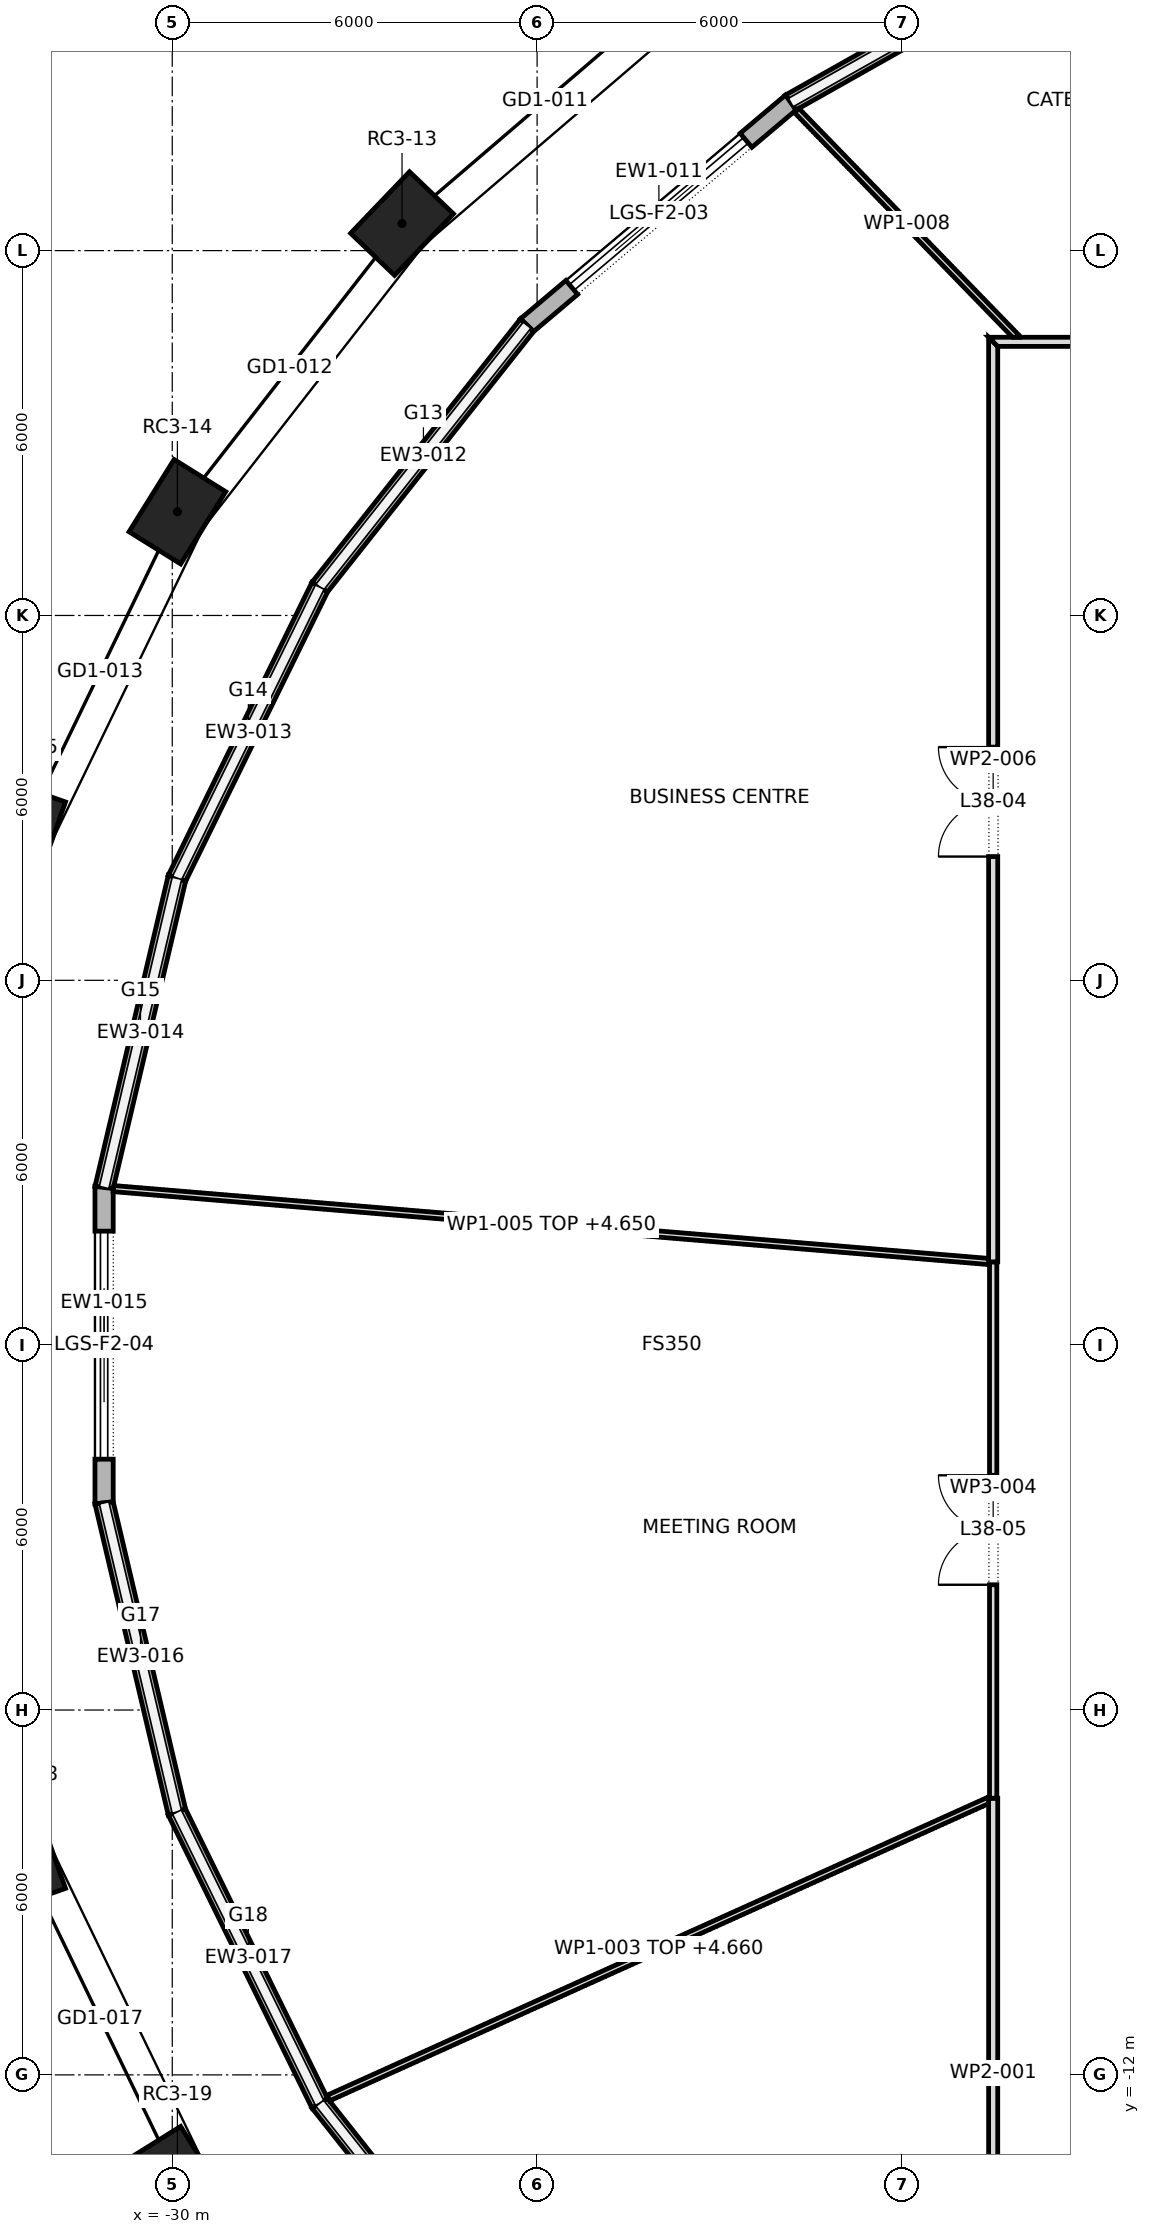
"""IFC4 building model, lengths in metres.
Left out: names, types, materials, properties, quantities, classifications, styles, units other than length and angle.
Written with IfcOpenShell. Run it as: python <this file> out.ifc"""

import sys

from ifc_helpers import new_model, si_unit, direction, frame, frame_2d, origin, origin_2d, place, context, subcontext, project, spatial, polyline, rectangle, outline, extrude, element, fill, save


model = new_model("IFC4")
c1 = context("Model", 3, precision=1e-05, world=origin(), true_north=direction((0.0, 1.0)))
c2 = subcontext(c1, "Body", "Model", "MODEL_VIEW")
j1 = project(units=[si_unit("LENGTHUNIT", "METRE"), si_unit("PLANEANGLEUNIT", "RADIAN")], contexts=[c1])
p1 = place(None, origin())
s1 = spatial("IfcSite", under=j1, at=p1, CompositionType="ELEMENT")
p2 = place(p1, origin())
s2 = spatial("IfcBuilding", under=s1, at=p2, CompositionType="ELEMENT")
p3 = place(p2, frame((0.0, 0.0, 167.5)))
s3 = spatial("IfcBuildingStorey", under=s2, at=p3, CompositionType="ELEMENT", Elevation=167.5)
for number, where, z_axis, x_axis in (
    (1, (-26.221, 18.445, 0.0), (0.0, 0.0, 1.0), (-0.692, -0.722, 0.0)),
    (2, (-29.916, 13.706, 0.0), (0.0, 0.0, 1.0), (-0.529, -0.849, 0.0)),
    (3, (-32.46, 8.44, 0.0), (0.0, 0.0, 1.0), (-0.334, -0.943, 0.0)),
    (4, (-32.46, -8.44, 0.0), (0.0, 0.0, 1.0), (0.334, -0.943, 0.0)),
    (5, (-29.916, -13.706, 0.0), (0.0, 0.0, 1.0), (0.529, -0.849, 0.0)),
):
    element("IfcColumn", number, at=place(p3, frame(where, z_axis=z_axis, x_axis=x_axis)), inside=s3, PredefinedType="COLUMN", context=c2, shape_type="SweptSolid", body=[
        extrude(rectangle(XDim=1.4, YDim=1.0, at=origin_2d()), origin(), (0.0, 0.0, 1.0), 6.0),
    ])
p4 = place(p3, frame((-14.732, 23.31, 5.2), z_axis=(0.0, 0.0, 1.0), x_axis=(-0.870982130072, -0.491314694565, 0.0)))
e6 = element("IfcWall", 6, at=p4, inside=s3, PredefinedType="STANDARD", context=c2, shape_type="SweptSolid", body=[
    extrude(outline(polyline([(-0.013, -0.15), (5.866, -0.15), (5.837, 0.15), (0.013, 0.15), (-0.013, -0.15)])), origin(), (0.0, 0.0, 1.0), 0.45),
])
p5 = place(p3, frame((-19.829, 20.435, 0.0), z_axis=(0.0, 0.0, 1.0), x_axis=(-0.764076096085, -0.645126126732, 0.0)))
e7 = element("IfcWall", 7, at=p5, inside=s3, PredefinedType="STANDARD", context=c2, shape_type="SweptSolid", body=[
    extrude(outline(polyline([(-0.014, -0.15), (5.69, -0.15), (5.66, 0.15), (0.014, 0.15), (-0.014, -0.15)])), origin(), (0.0, 0.0, 1.0), 5.65),
])
p6 = place(p5, frame((0.962, 0.0, 0.0)))
e8 = element("IfcOpeningElement", 8, at=p6, cuts=e7, PredefinedType="OPENING", context=c2, shape_type="SweptSolid", body=[
    extrude(rectangle(XDim=3.75, YDim=5.2, at=frame_2d((1.875, 2.6))), frame((0.0, 0.162, 0.0), z_axis=(0.0, -1.0, 0.0), x_axis=(1.0, 0.0, 0.0)), (0.0, 0.0, 1.0), 0.324),
])
p7 = place(p3, frame((-24.165, 16.774, 5.2), z_axis=(0.0, 0.0, 1.0), x_axis=(-0.620577705153, -0.784144955902, 0.0)))
e9 = element("IfcWall", 9, at=p7, inside=s3, PredefinedType="STANDARD", context=c2, shape_type="SweptSolid", body=[
    extrude(outline(polyline([(-0.015, -0.15), (5.509, -0.15), (5.477, 0.15), (0.015, 0.15), (-0.015, -0.15)])), origin(), (0.0, 0.0, 1.0), 0.45),
])
p8 = place(p3, frame((-27.574, 12.467, 5.2), z_axis=(0.0, 0.0, 1.0), x_axis=(-0.440444485575, -0.897779847806, 0.0)))
e10 = element("IfcWall", 10, at=p8, inside=s3, PredefinedType="STANDARD", context=c2, shape_type="SweptSolid", body=[
    extrude(outline(polyline([(-0.016, -0.15), (5.35, -0.15), (5.317, 0.15), (0.016, 0.15), (-0.016, -0.15)])), origin(), (0.0, 0.0, 1.0), 0.45),
])
p9 = place(p3, frame((-29.923, 7.678, 5.2), z_axis=(0.0, 0.0, 1.0), x_axis=(-0.229297175564, -0.973356463624, 0.0)))
e11 = element("IfcWall", 11, at=p9, inside=s3, PredefinedType="STANDARD", context=c2, shape_type="SweptSolid", body=[
    extrude(outline(polyline([(-0.017, -0.15), (5.242, -0.15), (5.207, 0.15), (0.017, 0.15), (-0.017, -0.15)])), origin(), (0.0, 0.0, 1.0), 0.45),
])
p10 = place(p3, frame((-31.121, 2.593, 0.0), z_axis=(0.0, 0.0, 1.0), x_axis=(0.0, -1.0, 0.0)))
e12 = element("IfcWall", 12, at=p10, inside=s3, PredefinedType="STANDARD", context=c2, shape_type="SweptSolid", body=[
    extrude(outline(polyline([(-0.017, -0.15), (5.203, -0.15), (5.168, 0.15), (0.017, 0.15), (-0.017, -0.15)])), origin(), (0.0, 0.0, 1.0), 5.65),
])
p11 = place(p10, frame((0.718, 0.0, 0.0)))
e13 = element("IfcOpeningElement", 13, at=p11, cuts=e12, PredefinedType="OPENING", context=c2, shape_type="SweptSolid", body=[
    extrude(rectangle(XDim=3.75, YDim=5.2, at=frame_2d((1.875, 2.6))), frame((0.0, 0.162, 0.0), z_axis=(0.0, -1.0, 0.0), x_axis=(1.0, 0.0, 0.0)), (0.0, 0.0, 1.0), 0.324),
])
p12 = place(p3, frame((-31.121, -2.593, 5.2), z_axis=(0.0, 0.0, 1.0), x_axis=(0.229297175564, -0.973356463624, 0.0)))
e14 = element("IfcWall", 14, at=p12, inside=s3, PredefinedType="STANDARD", context=c2, shape_type="SweptSolid", body=[
    extrude(outline(polyline([(-0.017, -0.15), (5.241, -0.15), (5.208, 0.15), (0.017, 0.15), (-0.017, -0.15)])), origin(), (0.0, 0.0, 1.0), 0.45),
])
p13 = place(p3, frame((-29.923, -7.678, 5.2), z_axis=(0.0, 0.0, 1.0), x_axis=(0.440444485575, -0.897779847806, 0.0)))
e15 = element("IfcWall", 15, at=p13, inside=s3, PredefinedType="STANDARD", context=c2, shape_type="SweptSolid", body=[
    extrude(outline(polyline([(-0.017, -0.15), (5.35, -0.15), (5.317, 0.15), (0.017, 0.15), (-0.017, -0.15)])), origin(), (0.0, 0.0, 1.0), 0.45),
])
p14 = place(p3, frame((-27.574, -12.467, 5.2), z_axis=(0.0, 0.0, 1.0), x_axis=(0.620577705153, -0.784144955902, 0.0)))
e16 = element("IfcWall", 16, at=p14, inside=s3, PredefinedType="STANDARD", context=c2, shape_type="SweptSolid", body=[
    extrude(outline(polyline([(-0.016, -0.15), (5.508, -0.15), (5.478, 0.15), (0.016, 0.15), (-0.016, -0.15)])), origin(), (0.0, 0.0, 1.0), 0.45),
])
p15 = place(p3, frame((-16.5, -16.575, 0.0), z_axis=(0.0, 0.0, 1.0), x_axis=(0.0, 1.0, 0.0)))
e17 = element("IfcWall", 17, at=p15, inside=s3, PredefinedType="PARTITIONING", context=c2, shape_type="SweptSolid", body=[
    extrude(outline(polyline([(9.125, 0.075), (7.3, 0.075), (5.475, 0.075), (3.65, 0.075), (1.825, 0.075), (0.0, 0.075), (0.15, -0.075), (1.945, -0.075), (3.74, -0.075), (5.535, -0.075), (7.33, -0.075), (9.125, -0.075), (9.125, 0.075)])), origin(), (0.0, 0.0, 1.0), 5.65),
])
p16 = place(p3, frame((-16.54, -7.468, 0.0), z_axis=(0.0, 0.0, 1.0), x_axis=(-0.911586306474, -0.411108751851, 0.0)))
e18 = element("IfcWall", 18, at=p16, inside=s3, PredefinedType="PARTITIONING", context=c2, shape_type="SweptSolid", body=[
    extrude(outline(polyline([(11.949, 0.05), (9.968, 0.05), (7.986, 0.05), (6.005, 0.05), (4.024, 0.05), (2.042, 0.05), (0.061, 0.05), (0.025, -0.031), (0.011, -0.025), (0.0, -0.049), (0.0, -0.05), (1.991, -0.05), (3.983, -0.05), (5.975, -0.05), (7.966, -0.05), (9.958, -0.05), (11.949, -0.05), (11.949, 0.05)])), origin(), (0.0, 0.0, 1.0), 4.66),
])
p17 = place(p3, frame((-16.5, -7.45, 0.0), z_axis=(0.0, 0.0, 1.0), x_axis=(0.0, 1.0, 0.0)))
e19 = element("IfcWall", 19, at=p17, inside=s3, PredefinedType="PARTITIONING", context=c2, shape_type="SweptSolid", body=[
    extrude(rectangle(XDim=8.82, YDim=0.12, at=frame_2d((4.41, 0.0))), origin(), (0.0, 0.0, 1.0), 5.65),
])
p18 = place(p17, frame((3.51, 0.0, 0.0)))
e20 = element("IfcOpeningElement", 20, at=p18, cuts=e19, PredefinedType="OPENING", context=c2, shape_type="SweptSolid", body=[
    extrude(rectangle(XDim=1.8, YDim=2.1, at=frame_2d((0.9, 1.05))), frame((0.0, 0.072, 0.0), z_axis=(0.0, -1.0, 0.0), x_axis=(1.0, 0.0, 0.0)), (0.0, 0.0, 1.0), 0.144),
])
p19 = place(p3, frame((-16.556, 1.375, 0.0), z_axis=(0.0, 0.0, 1.0), x_axis=(-0.996550995981, 0.082982603054, 0.0)))
e21 = element("IfcWall", 21, at=p19, inside=s3, PredefinedType="PARTITIONING", context=c2, shape_type="SweptSolid", body=[
    extrude(outline(polyline([(0.023, -0.05), (1.827, -0.05), (3.631, -0.05), (5.436, -0.05), (7.24, -0.05), (9.044, -0.05), (10.849, -0.05), (12.653, -0.05), (14.457, -0.05), (14.46, -0.031), (14.46, 0.05), (12.653, 0.05), (10.845, 0.05), (9.038, 0.05), (7.23, 0.05), (5.423, 0.05), (3.615, 0.05), (1.808, 0.05), (0.0, 0.05), (0.0, 0.043), (0.003, 0.005), (0.018, 0.006), (0.023, -0.05)])), origin(), (0.0, 0.0, 1.0), 4.65),
])
p20 = place(p3, frame((-16.5, 1.37, 0.0), z_axis=(0.0, 0.0, 1.0), x_axis=(0.0, 1.0, 0.0)))
e22 = element("IfcWall", 22, at=p20, inside=s3, PredefinedType="PARTITIONING", context=c2, shape_type="SweptSolid", body=[
    extrude(outline(polyline([(0.0, -0.075), (1.882, -0.075), (3.764, -0.075), (5.646, -0.075), (7.527, -0.075), (9.409, -0.075), (11.291, -0.075), (13.173, -0.075), (15.055, -0.075), (15.205, 0.075), (13.304, 0.075), (11.404, 0.075), (9.503, 0.075), (7.603, 0.075), (5.702, 0.075), (3.801, 0.075), (1.901, 0.075), (0.0, 0.075), (0.0, -0.075)])), origin(), (0.0, 0.0, 1.0), 5.65),
])
p21 = place(p20, frame((6.665, 0.0, 0.0)))
e23 = element("IfcOpeningElement", 23, at=p21, cuts=e22, PredefinedType="OPENING", context=c2, shape_type="SweptSolid", body=[
    extrude(rectangle(XDim=1.8, YDim=2.1, at=frame_2d((0.9, 1.05))), frame((0.0, 0.087, 0.0), z_axis=(0.0, -1.0, 0.0), x_axis=(1.0, 0.0, 0.0)), (0.0, 0.0, 1.0), 0.174),
])
p22 = place(p3, frame((-16.575, 16.5, 0.0), z_axis=(0.0, 0.0, 1.0), x_axis=(1.0, 0.0, 0.0)))
e24 = element("IfcWall", 24, at=p22, inside=s3, PredefinedType="PARTITIONING", context=c2, shape_type="SweptSolid", body=[
    extrude(outline(polyline([(0.15, -0.075), (2.082, -0.075), (4.015, -0.075), (5.947, -0.075), (7.879, -0.075), (9.812, -0.075), (11.744, -0.075), (13.677, -0.075), (15.609, -0.075), (17.541, -0.075), (19.473, -0.075), (21.406, -0.075), (23.338, -0.075), (25.271, -0.075), (27.203, -0.075), (29.135, -0.075), (31.068, -0.075), (33.0, -0.075), (33.15, 0.075), (31.2, 0.075), (29.25, 0.075), (27.3, 0.075), (25.35, 0.075), (23.4, 0.075), (21.45, 0.075), (19.5, 0.075), (17.55, 0.075), (15.6, 0.075), (13.65, 0.075), (11.7, 0.075), (9.75, 0.075), (7.8, 0.075), (5.85, 0.075), (3.9, 0.075), (1.95, 0.075), (0.0, 0.075), (0.15, -0.075)])), origin(), (0.0, 0.0, 1.0), 5.65),
])
p23 = place(p22, frame((27.29, 0.0, 0.0)))
e25 = element("IfcOpeningElement", 25, at=p23, cuts=e24, PredefinedType="OPENING", context=c2, shape_type="SweptSolid", body=[
    extrude(rectangle(XDim=1.0, YDim=2.1, at=frame_2d((0.5, 1.05))), frame((0.0, 0.087, 0.0), z_axis=(0.0, -1.0, 0.0), x_axis=(1.0, 0.0, 0.0)), (0.0, 0.0, 1.0), 0.174),
])
p24 = place(p22, frame((16.075, 0.0, 0.0)))
e26 = element("IfcOpeningElement", 26, at=p24, cuts=e24, PredefinedType="OPENING", context=c2, shape_type="SweptSolid", body=[
    extrude(rectangle(XDim=1.0, YDim=2.1, at=frame_2d((0.5, 1.05))), frame((0.0, 0.087, 0.0), z_axis=(0.0, -1.0, 0.0), x_axis=(1.0, 0.0, 0.0)), (0.0, 0.0, 1.0), 0.174),
])
p25 = place(p22, frame((5.09, 0.0, 0.0)))
e27 = element("IfcOpeningElement", 27, at=p25, cuts=e24, PredefinedType="OPENING", context=c2, shape_type="SweptSolid", body=[
    extrude(rectangle(XDim=1.0, YDim=2.1, at=frame_2d((0.5, 1.05))), frame((0.0, 0.087, 0.0), z_axis=(0.0, -1.0, 0.0), x_axis=(1.0, 0.0, 0.0)), (0.0, 0.0, 1.0), 0.174),
])
p26 = place(p3, frame((-16.079, 16.541, 0.0), z_axis=(0.0, 0.0, 1.0), x_axis=(-0.696335683959, 0.717716249812, 0.0)))
e28 = element("IfcWall", 28, at=p26, inside=s3, PredefinedType="PARTITIONING", context=c2, shape_type="SweptSolid", body=[
    extrude(outline(polyline([(5.241, 0.05), (3.526, 0.05), (1.812, 0.05), (0.097, 0.05), (0.0, -0.05), (0.0, -0.05), (1.747, -0.05), (3.494, -0.05), (5.241, -0.05), (5.241, 0.05)])), origin(), (0.0, 0.0, 1.0), 5.65),
])
p27 = place(p6, origin())
e29 = element("IfcDoor", 29, at=p27, inside=s3, OperationType="DOUBLE_DOOR_SLIDING", PredefinedType="DOOR", context=c2, shape_type="SweptSolid", body=[
    extrude(rectangle(XDim=3.75, YDim=5.2, at=frame_2d((1.875, 2.6))), frame((0.0, 0.025, 0.0), z_axis=(0.0, -1.0, 0.0), x_axis=(1.0, 0.0, 0.0)), (0.0, 0.0, 1.0), 0.05),
])
fill(e8, e29)
p28 = place(p11, origin())
e30 = element("IfcDoor", 30, at=p28, inside=s3, OperationType="DOUBLE_DOOR_SLIDING", PredefinedType="DOOR", context=c2, shape_type="SweptSolid", body=[
    extrude(rectangle(XDim=3.75, YDim=5.2, at=frame_2d((1.875, 2.6))), frame((0.0, 0.025, 0.0), z_axis=(0.0, -1.0, 0.0), x_axis=(1.0, 0.0, 0.0)), (0.0, 0.0, 1.0), 0.05),
])
fill(e13, e30)
p29 = place(p21, origin())
e31 = element("IfcDoor", 31, at=p29, inside=s3, OperationType="DOUBLE_DOOR_SINGLE_SWING", PredefinedType="DOOR", context=c2, shape_type="SweptSolid", body=[
    extrude(rectangle(XDim=1.8, YDim=2.1, at=frame_2d((0.9, 1.05))), frame((0.0, 0.025, 0.0), z_axis=(0.0, -1.0, 0.0), x_axis=(1.0, 0.0, 0.0)), (0.0, 0.0, 1.0), 0.05),
])
fill(e23, e31)
p30 = place(p18, origin())
e32 = element("IfcDoor", 32, at=p30, inside=s3, OperationType="DOUBLE_DOOR_SINGLE_SWING", PredefinedType="DOOR", context=c2, shape_type="SweptSolid", body=[
    extrude(rectangle(XDim=1.8, YDim=2.1, at=frame_2d((0.9, 1.05))), frame((0.0, 0.025, 0.0), z_axis=(0.0, -1.0, 0.0), x_axis=(1.0, 0.0, 0.0)), (0.0, 0.0, 1.0), 0.05),
])
fill(e20, e32)
save(model, sys.argv[1])
